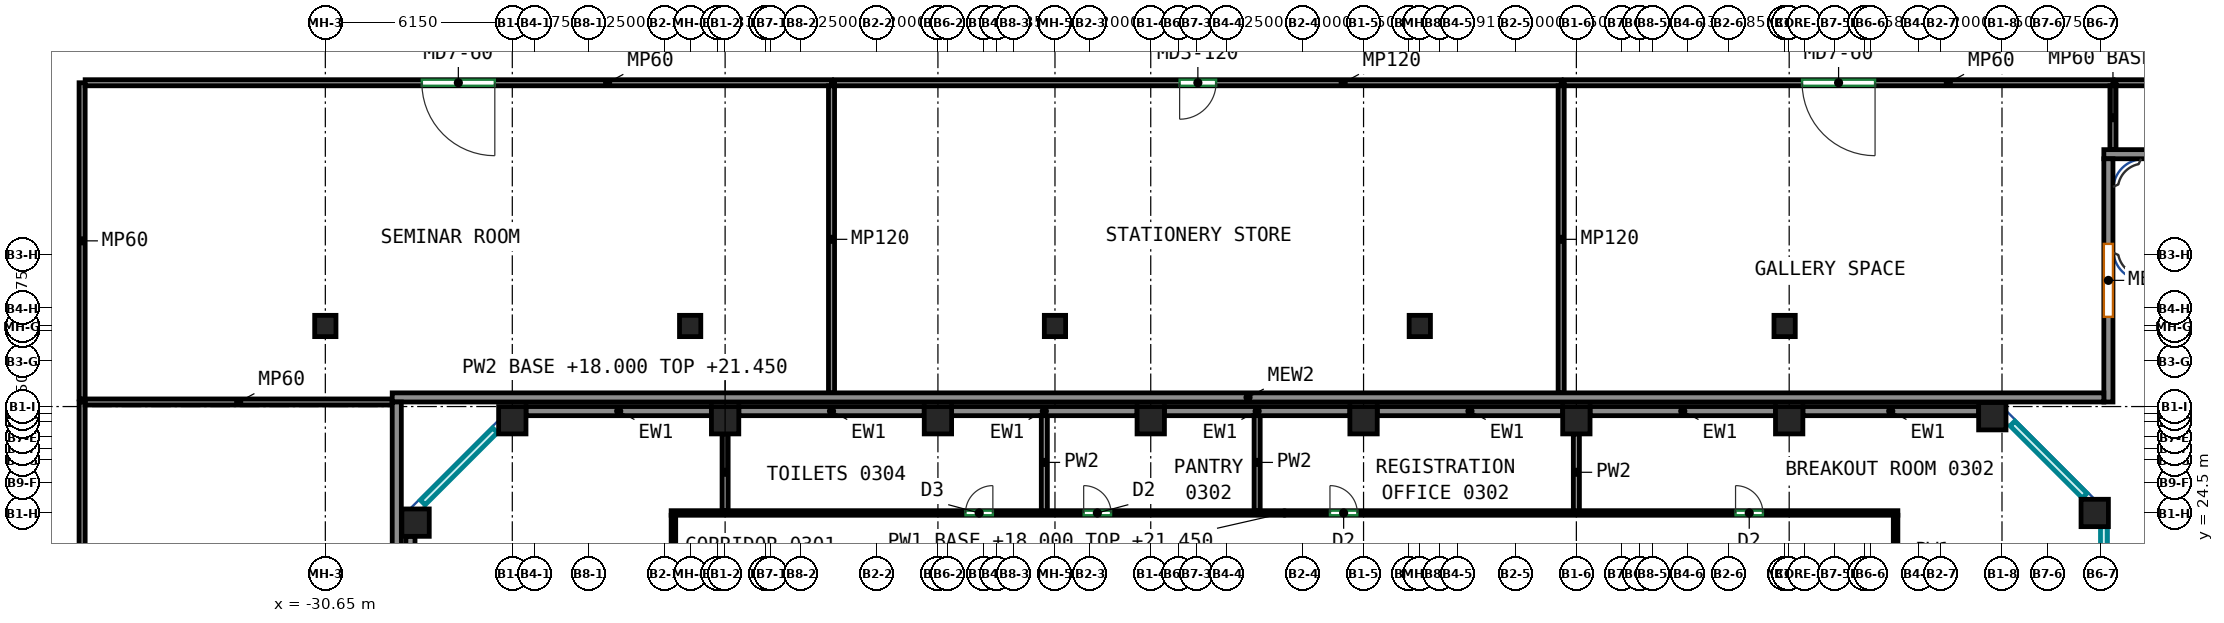
"""IFC4 building model, lengths in metres.
Left out: names, types, materials, properties, quantities, classifications, styles, units other than length and angle.
Written with IfcOpenShell. Run it as: python <this file> out.ifc"""

import sys

from ifc_helpers import new_model, si_unit, direction, frame, frame_2d, origin, origin_2d, place, context, subcontext, project, spatial, rectangle, extrude, source, transform, mapped, element, fill, save


model = new_model("IFC4")
c1 = context("Model", 3, precision=1e-05, world=origin(), true_north=direction((0.0, 1.0)))
c2 = subcontext(c1, "Body", "Model", "MODEL_VIEW")
j1 = project(units=[si_unit("LENGTHUNIT", "METRE"), si_unit("PLANEANGLEUNIT", "RADIAN")], contexts=[c1])
p1 = place(None, origin())
s1 = spatial("IfcSite", under=j1, at=p1, CompositionType="ELEMENT")
p2 = place(p1, origin())
s2 = spatial("IfcBuilding", under=s1, at=p2, CompositionType="ELEMENT")
p3 = place(p2, frame((0.0, 0.0, 18.0)))
s3 = spatial("IfcBuildingStorey", under=s2, at=p3, CompositionType="ELEMENT", Elevation=18.0)
m1 = source(origin(), c2, "Body", "SweptSolid", [
    extrude(rectangle(XDim=0.9, YDim=0.9, at=origin_2d()), origin(), (0.0, 0.0, 1.0), 4.1),
])
for number, where, z_axis, x_axis in (
    (1, (-27.682, 24.182, 0.0), (0.0, 0.0, 1.0), (1.0, 0.0, 0.0)),
    (2, (-24.5, 27.55, 0.0), (0.0, 0.0, 1.0), (1.0, 0.0, 0.0)),
    (3, (-17.5, 27.55, 0.0), (0.0, 0.0, 1.0), (1.0, 0.0, 0.0)),
    (4, (-10.5, 27.55, 0.0), (0.0, 0.0, 1.0), (1.0, 0.0, 0.0)),
    (5, (-3.5, 27.55, 0.0), (0.0, 0.0, 1.0), (1.0, 0.0, 0.0)),
    (6, (3.5, 27.55, 0.0), (0.0, 0.0, 1.0), (1.0, 0.0, 0.0)),
    (7, (10.5, 27.55, 0.0), (0.0, 0.0, 1.0), (1.0, 0.0, 0.0)),
    (8, (17.5, 27.55, 0.0), (0.0, 0.0, 1.0), (1.0, 0.0, 0.0)),
    (9, (24.182, 27.682, 0.0), (0.0, 0.0, 1.0), (1.0, 0.0, 0.0)),
    (10, (27.55, 24.5, 0.0), (0.0, 0.0, 1.0), (1.0, 0.0, 0.0)),
):
    element("IfcColumn", number, at=place(p3, frame(where, z_axis=z_axis, x_axis=x_axis)), inside=s3, PredefinedType="COLUMN", context=c2, shape_type="MappedRepresentation", body=[
        mapped(m1, transform((0.0, 0.0, 0.0))),
    ])
m2 = source(origin(), c2, "Body", "SweptSolid", [
    extrude(rectangle(XDim=0.7, YDim=0.7, at=origin_2d()), origin(), (0.0, 0.0, 1.0), 4.1),
])
for number, where, z_axis, x_axis in (
    (11, (-30.65, 30.65, 0.0), (0.0, 0.0, 1.0), (1.0, 0.0, 0.0)),
    (12, (-18.65, 30.65, 0.0), (0.0, 0.0, 1.0), (1.0, 0.0, 0.0)),
    (13, (-6.65, 30.65, 0.0), (0.0, 0.0, 1.0), (1.0, 0.0, 0.0)),
    (14, (5.35, 30.65, 0.0), (0.0, 0.0, 1.0), (1.0, 0.0, 0.0)),
    (15, (17.35, 30.65, 0.0), (0.0, 0.0, 1.0), (1.0, 0.0, 0.0)),
):
    element("IfcColumn", number, at=place(p3, frame(where, z_axis=z_axis, x_axis=x_axis)), inside=s3, PredefinedType="COLUMN", context=c2, shape_type="MappedRepresentation", body=[
        mapped(m2, transform((0.0, 0.0, 0.0))),
    ])
m3 = source(origin(), c2, "Body", "SweptSolid", [
    extrude(rectangle(XDim=5.782, YDim=0.3, at=frame_2d((2.891, 0.0))), origin(), (0.0, 0.0, 1.0), 4.1),
])
p4 = place(p3, frame((23.732, 27.85, 0.0), z_axis=(0.0, 0.0, 1.0), x_axis=(-1.0, 0.0, 0.0)))
e16 = element("IfcWall", 16, at=p4, inside=s3, PredefinedType="SOLIDWALL", context=c2, shape_type="MappedRepresentation", body=[
    mapped(m3, transform((0.0, 0.0, 0.0))),
])
m4 = source(origin(), c2, "Body", "SweptSolid", [
    extrude(rectangle(XDim=6.1, YDim=0.3, at=frame_2d((3.05, 0.0))), origin(), (0.0, 0.0, 1.0), 4.1),
])
for number, where, z_axis, x_axis in (
    (17, (17.05, 27.85, 0.0), (0.0, 0.0, 1.0), (-1.0, 0.0, 0.0)),
    (18, (10.05, 27.85, 0.0), (0.0, 0.0, 1.0), (-1.0, 0.0, 0.0)),
    (19, (3.05, 27.85, 0.0), (0.0, 0.0, 1.0), (-1.0, 0.0, 0.0)),
    (20, (-3.95, 27.85, 0.0), (0.0, 0.0, 1.0), (-1.0, 0.0, 0.0)),
    (21, (-10.95, 27.85, 0.0), (0.0, 0.0, 1.0), (-1.0, 0.0, 0.0)),
    (22, (-17.95, 27.85, 0.0), (0.0, 0.0, 1.0), (-1.0, 0.0, 0.0)),
):
    element("IfcWall", number, at=place(p3, frame(where, z_axis=z_axis, x_axis=x_axis)), inside=s3, PredefinedType="SOLIDWALL", context=c2, shape_type="MappedRepresentation", body=[
        mapped(m4, transform((0.0, 0.0, 0.0))),
    ])
m5 = source(origin(), c2, "Body", "SweptSolid", [
    extrude(rectangle(XDim=15.282, YDim=0.3, at=frame_2d((7.641, 0.0))), origin(), (0.0, 0.0, 1.0), 4.1),
])
p5 = place(p3, frame((-27.85, 23.732, 0.0), z_axis=(0.0, 0.0, 1.0), x_axis=(0.0, -1.0, 0.0)))
e23 = element("IfcWall", 23, at=p5, inside=s3, PredefinedType="SOLIDWALL", context=c2, shape_type="MappedRepresentation", body=[
    mapped(m5, transform((0.0, 0.0, 0.0))),
])
m6 = source(origin(), c2, "Body", "SweptSolid", [
    extrude(rectangle(XDim=27.7, YDim=0.3, at=frame_2d((13.85, 0.0))), origin(), (0.0, 0.0, 1.0), 4.1),
])
p6 = place(p3, frame((55.55, 36.3, 0.0), z_axis=(0.0, 0.0, 1.0), x_axis=(-1.0, 0.0, 0.0)))
e24 = element("IfcWall", 24, at=p6, inside=s3, PredefinedType="SOLIDWALL", context=c2, shape_type="MappedRepresentation", body=[
    mapped(m6, transform((0.0, 0.0, 0.0))),
])
p7 = place(p6, frame((7.11, 0.0, 0.0)))
e25 = element("IfcOpeningElement", 25, at=p7, cuts=e24, PredefinedType="OPENING", context=c2, shape_type="SweptSolid", body=[
    extrude(rectangle(XDim=2.4, YDim=2.4, at=frame_2d((1.2, 1.2))), frame((0.0, 0.16, 0.0), z_axis=(0.0, -1.0, 0.0), x_axis=(1.0, 0.0, 0.0)), (0.0, 0.0, 1.0), 0.32),
])
p8 = place(p6, frame((18.19, 0.0, 0.0)))
e26 = element("IfcOpeningElement", 26, at=p8, cuts=e24, PredefinedType="OPENING", context=c2, shape_type="SweptSolid", body=[
    extrude(rectangle(XDim=2.4, YDim=2.4, at=frame_2d((1.2, 1.2))), frame((0.0, 0.16, 0.0), z_axis=(0.0, -1.0, 0.0), x_axis=(1.0, 0.0, 0.0)), (0.0, 0.0, 1.0), 0.32),
])
p9 = place(p6, frame((2.65, 0.0, 0.9)))
e27 = element("IfcOpeningElement", 27, at=p9, cuts=e24, PredefinedType="OPENING", context=c2, shape_type="SweptSolid", body=[
    extrude(rectangle(XDim=2.4, YDim=1.8, at=frame_2d((1.2, 0.9))), frame((0.0, 0.16, 0.0), z_axis=(0.0, -1.0, 0.0), x_axis=(1.0, 0.0, 0.0)), (0.0, 0.0, 1.0), 0.32),
])
p10 = place(p6, frame((10.65, 0.0, 0.9)))
e28 = element("IfcOpeningElement", 28, at=p10, cuts=e24, PredefinedType="OPENING", context=c2, shape_type="SweptSolid", body=[
    extrude(rectangle(XDim=2.4, YDim=1.8, at=frame_2d((1.2, 0.9))), frame((0.0, 0.16, 0.0), z_axis=(0.0, -1.0, 0.0), x_axis=(1.0, 0.0, 0.0)), (0.0, 0.0, 1.0), 0.32),
])
p11 = place(p6, frame((14.65, 0.0, 0.9)))
e29 = element("IfcOpeningElement", 29, at=p11, cuts=e24, PredefinedType="OPENING", context=c2, shape_type="SweptSolid", body=[
    extrude(rectangle(XDim=2.4, YDim=1.8, at=frame_2d((1.2, 0.9))), frame((0.0, 0.16, 0.0), z_axis=(0.0, -1.0, 0.0), x_axis=(1.0, 0.0, 0.0)), (0.0, 0.0, 1.0), 0.32),
])
p12 = place(p6, frame((22.65, 0.0, 0.9)))
e30 = element("IfcOpeningElement", 30, at=p12, cuts=e24, PredefinedType="OPENING", context=c2, shape_type="SweptSolid", body=[
    extrude(rectangle(XDim=2.4, YDim=1.8, at=frame_2d((1.2, 0.9))), frame((0.0, 0.16, 0.0), z_axis=(0.0, -1.0, 0.0), x_axis=(1.0, 0.0, 0.0)), (0.0, 0.0, 1.0), 0.32),
])
m7 = source(origin(), c2, "Body", "SweptSolid", [
    extrude(rectangle(XDim=8.0, YDim=0.3, at=frame_2d((4.0, 0.0))), origin(), (0.0, 0.0, 1.0), 4.1),
])
p13 = place(p3, frame((28.0, 36.15, 0.0), z_axis=(0.0, 0.0, 1.0), x_axis=(0.0, -1.0, 0.0)))
e31 = element("IfcWall", 31, at=p13, inside=s3, PredefinedType="SOLIDWALL", context=c2, shape_type="MappedRepresentation", body=[
    mapped(m7, transform((0.0, 0.0, 0.0))),
])
p14 = place(p13, frame((2.8, 0.0, 0.9)))
e32 = element("IfcOpeningElement", 32, at=p14, cuts=e31, PredefinedType="OPENING", context=c2, shape_type="SweptSolid", body=[
    extrude(rectangle(XDim=2.4, YDim=1.8, at=frame_2d((1.2, 0.9))), frame((0.0, 0.16, 0.0), z_axis=(0.0, -1.0, 0.0), x_axis=(1.0, 0.0, 0.0)), (0.0, 0.0, 1.0), 0.32),
])
m8 = source(origin(), c2, "Body", "SweptSolid", [
    extrude(rectangle(XDim=56.3, YDim=0.3, at=frame_2d((28.15, 0.0))), origin(), (0.0, 0.0, 1.0), 4.1),
])
p15 = place(p3, frame((27.85, 28.3, 0.0), z_axis=(0.0, 0.0, 1.0), x_axis=(-1.0, 0.0, 0.0)))
e33 = element("IfcWall", 33, at=p15, inside=s3, PredefinedType="SOLIDWALL", context=c2, shape_type="MappedRepresentation", body=[
    mapped(m8, transform((0.0, 0.0, 0.0))),
])
m9 = source(origin(), c2, "Body", "SweptSolid", [
    extrude(rectangle(XDim=56.3, YDim=0.3, at=frame_2d((28.15, 0.0))), origin(), (0.0, 0.0, 1.0), 4.1),
])
p16 = place(p3, frame((-28.3, 28.15, 0.0), z_axis=(0.0, 0.0, 1.0), x_axis=(0.0, -1.0, 0.0)))
e34 = element("IfcWall", 34, at=p16, inside=s3, PredefinedType="SOLIDWALL", context=c2, shape_type="MappedRepresentation", body=[
    mapped(m9, transform((0.0, 0.0, 0.0))),
])
p17 = place(p3, frame((21.0, 22.09, 0.0), z_axis=(0.0, 0.0, 1.0), x_axis=(0.0, 1.0, 0.0)))
e35 = element("IfcWall", 35, at=p17, inside=s3, PredefinedType="PARTITIONING", context=c2, shape_type="SweptSolid", body=[
    extrude(rectangle(XDim=2.335, YDim=0.15, at=frame_2d((1.167, 0.0))), origin(), (0.0, 0.0, 1.0), 4.1),
])
p18 = place(p3, frame((-19.2, 8.09, 0.0), z_axis=(0.0, 0.0, 1.0), x_axis=(0.0, 1.0, 0.0)))
e36 = element("IfcWall", 36, at=p18, inside=s3, PredefinedType="PARTITIONING", context=c2, shape_type="SweptSolid", body=[
    extrude(rectangle(XDim=16.335, YDim=0.15, at=frame_2d((8.167, 0.0))), origin(), (0.0, 0.0, 1.0), 4.1),
])
p19 = place(p18, frame((8.72, 0.0, 0.0)))
e37 = element("IfcOpeningElement", 37, at=p19, cuts=e36, PredefinedType="OPENING", context=c2, shape_type="SweptSolid", body=[
    extrude(rectangle(XDim=0.9, YDim=2.1, at=frame_2d((0.45, 1.05))), frame((0.0, 0.085, 0.0), z_axis=(0.0, -1.0, 0.0), x_axis=(1.0, 0.0, 0.0)), (0.0, 0.0, 1.0), 0.17),
])
p20 = place(p3, frame((-19.275, 24.5, 0.0), z_axis=(0.0, 0.0, 1.0), x_axis=(1.0, 0.0, 0.0)))
e38 = element("IfcWall", 38, at=p20, inside=s3, PredefinedType="PARTITIONING", context=c2, shape_type="SweptSolid", body=[
    extrude(rectangle(XDim=40.35, YDim=0.15, at=frame_2d((20.175, 0.0))), origin(), (0.0, 0.0, 1.0), 3.45),
])
p21 = place(p20, frame((9.682, 0.0, 0.0)))
e39 = element("IfcOpeningElement", 39, at=p21, cuts=e38, PredefinedType="OPENING", context=c2, shape_type="SweptSolid", body=[
    extrude(rectangle(XDim=0.9, YDim=2.1, at=frame_2d((0.45, 1.05))), frame((0.0, 0.085, 0.0), z_axis=(0.0, -1.0, 0.0), x_axis=(1.0, 0.0, 0.0)), (0.0, 0.0, 1.0), 0.17),
])
p22 = place(p20, frame((13.569, 0.0, 0.0)))
e40 = element("IfcOpeningElement", 40, at=p22, cuts=e38, PredefinedType="OPENING", context=c2, shape_type="SweptSolid", body=[
    extrude(rectangle(XDim=0.9, YDim=2.1, at=frame_2d((0.45, 1.05))), frame((0.0, 0.085, 0.0), z_axis=(0.0, -1.0, 0.0), x_axis=(1.0, 0.0, 0.0)), (0.0, 0.0, 1.0), 0.17),
])
p23 = place(p20, frame((21.67, 0.0, 0.0)))
e41 = element("IfcOpeningElement", 41, at=p23, cuts=e38, PredefinedType="OPENING", context=c2, shape_type="SweptSolid", body=[
    extrude(rectangle(XDim=0.9, YDim=2.1, at=frame_2d((0.45, 1.05))), frame((0.0, 0.085, 0.0), z_axis=(0.0, -1.0, 0.0), x_axis=(1.0, 0.0, 0.0)), (0.0, 0.0, 1.0), 0.17),
])
p24 = place(p20, frame((35.011, 0.0, 0.0)))
e42 = element("IfcOpeningElement", 42, at=p24, cuts=e38, PredefinedType="OPENING", context=c2, shape_type="SweptSolid", body=[
    extrude(rectangle(XDim=0.9, YDim=2.1, at=frame_2d((0.45, 1.05))), frame((0.0, 0.085, 0.0), z_axis=(0.0, -1.0, 0.0), x_axis=(1.0, 0.0, 0.0)), (0.0, 0.0, 1.0), 0.17),
])
p25 = place(p3, frame((10.5, 27.1, 0.0), z_axis=(0.0, 0.0, 1.0), x_axis=(0.0, -1.0, 0.0)))
e43 = element("IfcWall", 43, at=p25, inside=s3, PredefinedType="PARTITIONING", context=c2, shape_type="SweptSolid", body=[
    extrude(rectangle(XDim=2.524, YDim=0.2, at=frame_2d((1.262, 0.0))), origin(), (0.0, 0.0, 1.0), 4.1),
])
for number, where, z_axis, x_axis in (
    (44, (0.0, 24.576, 0.0), (0.0, 0.0, 1.0), (0.0, 1.0, 0.0)),
    (45, (-7.0, 27.75, 0.0), (0.0, 0.0, 1.0), (0.0, -1.0, 0.0)),
):
    element("IfcWall", number, at=place(p3, frame(where, z_axis=z_axis, x_axis=x_axis)), inside=s3, PredefinedType="PARTITIONING", context=c2, shape_type="SweptSolid", body=[
        extrude(rectangle(XDim=3.174, YDim=0.2, at=frame_2d((1.587, 0.0))), origin(), (0.0, 0.0, 1.0), 4.1),
    ])
p26 = place(p3, frame((-17.5, 24.576, 0.0), z_axis=(0.0, 0.0, 1.0), x_axis=(0.0, 1.0, 0.0)))
e46 = element("IfcWall", 46, at=p26, inside=s3, PredefinedType="PARTITIONING", context=c2, shape_type="SweptSolid", body=[
    extrude(rectangle(XDim=2.524, YDim=0.2, at=frame_2d((1.262, 0.0))), origin(), (0.0, 0.0, 1.0), 3.45),
])
m10 = source(origin(), c2, "Body", "SweptSolid", [
    extrude(rectangle(XDim=18.05, YDim=0.2, at=frame_2d((9.025, 0.0))), origin(), (0.0, 0.0, 1.0), 3.3),
])
p27 = place(p3, frame((-38.65, 28.15, 0.0), z_axis=(0.0, 0.0, 1.0), x_axis=(0.0, -1.0, 0.0)))
e47 = element("IfcWall", 47, at=p27, inside=s3, PredefinedType="PARTITIONING", context=c2, shape_type="MappedRepresentation", body=[
    mapped(m10, transform((0.0, 0.0, 0.0))),
])
p28 = place(p27, frame((7.825, 0.0, 0.0)))
e48 = element("IfcOpeningElement", 48, at=p28, cuts=e47, PredefinedType="OPENING", context=c2, shape_type="SweptSolid", body=[
    extrude(rectangle(XDim=2.4, YDim=2.4, at=frame_2d((1.2, 1.2))), frame((0.0, 0.11, 0.0), z_axis=(0.0, -1.0, 0.0), x_axis=(1.0, 0.0, 0.0)), (0.0, 0.0, 1.0), 0.22),
])
m11 = source(origin(), c2, "Body", "SweptSolid", [
    extrude(rectangle(XDim=10.1, YDim=0.2, at=frame_2d((5.05, 0.0))), origin(), (0.0, 0.0, 1.0), 3.3),
])
p29 = place(p3, frame((-38.55, 28.15, 0.0), z_axis=(0.0, 0.0, 1.0), x_axis=(1.0, 0.0, 0.0)))
e49 = element("IfcWall", 49, at=p29, inside=s3, PredefinedType="PARTITIONING", context=c2, shape_type="MappedRepresentation", body=[
    mapped(m11, transform((0.0, 0.0, 0.0))),
])
m12 = source(origin(), c2, "Body", "SweptSolid", [
    extrude(rectangle(XDim=10.4, YDim=0.2, at=frame_2d((5.2, 0.0))), origin(), (0.0, 0.0, 1.0), 3.3),
])
p30 = place(p3, frame((-38.65, 38.65, 0.0), z_axis=(0.0, 0.0, 1.0), x_axis=(0.0, -1.0, 0.0)))
e50 = element("IfcWall", 50, at=p30, inside=s3, PredefinedType="PARTITIONING", context=c2, shape_type="MappedRepresentation", body=[
    mapped(m12, transform((0.0, 0.0, 0.0))),
])
m13 = source(origin(), c2, "Body", "SweptSolid", [
    extrude(rectangle(XDim=24.55, YDim=0.2, at=frame_2d((12.275, 0.0))), origin(), (0.0, 0.0, 1.0), 3.3),
])
p31 = place(p3, frame((-14.0, 38.65, 0.0), z_axis=(0.0, 0.0, 1.0), x_axis=(-1.0, 0.0, 0.0)))
e51 = element("IfcWall", 51, at=p31, inside=s3, PredefinedType="PARTITIONING", context=c2, shape_type="MappedRepresentation", body=[
    mapped(m13, transform((0.0, 0.0, 0.0))),
])
p32 = place(p31, frame((11.075, 0.0, 0.0)))
e52 = element("IfcOpeningElement", 52, at=p32, cuts=e51, PredefinedType="OPENING", context=c2, shape_type="SweptSolid", body=[
    extrude(rectangle(XDim=2.4, YDim=2.4, at=frame_2d((1.2, 1.2))), frame((0.0, 0.11, 0.0), z_axis=(0.0, -1.0, 0.0), x_axis=(1.0, 0.0, 0.0)), (0.0, 0.0, 1.0), 0.22),
])
p33 = place(p3, frame((-14.0, 38.55, 0.0), z_axis=(0.0, 0.0, 1.0), x_axis=(0.0, -1.0, 0.0)))
e53 = element("IfcWall", 53, at=p33, inside=s3, PredefinedType="PARTITIONING", context=c2, shape_type="MappedRepresentation", body=[
    mapped(m11, transform((0.0, 0.0, 0.0))),
])
m14 = source(origin(), c2, "Body", "SweptSolid", [
    extrude(rectangle(XDim=23.9, YDim=0.2, at=frame_2d((11.95, 0.0))), origin(), (0.0, 0.0, 1.0), 3.3),
])
p34 = place(p3, frame((10.0, 38.65, 0.0), z_axis=(0.0, 0.0, 1.0), x_axis=(-1.0, 0.0, 0.0)))
e54 = element("IfcWall", 54, at=p34, inside=s3, PredefinedType="PARTITIONING", context=c2, shape_type="MappedRepresentation", body=[
    mapped(m14, transform((0.0, 0.0, 0.0))),
])
p35 = place(p34, frame((11.35, 0.0, 0.0)))
e55 = element("IfcOpeningElement", 55, at=p35, cuts=e54, PredefinedType="OPENING", context=c2, shape_type="SweptSolid", body=[
    extrude(rectangle(XDim=1.2, YDim=2.1, at=frame_2d((0.6, 1.05))), frame((0.0, 0.11, 0.0), z_axis=(0.0, -1.0, 0.0), x_axis=(1.0, 0.0, 0.0)), (0.0, 0.0, 1.0), 0.22),
])
p36 = place(p3, frame((10.0, 38.55, 0.0), z_axis=(0.0, 0.0, 1.0), x_axis=(0.0, -1.0, 0.0)))
e56 = element("IfcWall", 56, at=p36, inside=s3, PredefinedType="PARTITIONING", context=c2, shape_type="MappedRepresentation", body=[
    mapped(m11, transform((0.0, 0.0, 0.0))),
])
p37 = place(p3, frame((28.15, 38.65, 0.0), z_axis=(0.0, 0.0, 1.0), x_axis=(-1.0, 0.0, 0.0)))
e57 = element("IfcWall", 57, at=p37, inside=s3, PredefinedType="PARTITIONING", context=c2, shape_type="MappedRepresentation", body=[
    mapped(m10, transform((0.0, 0.0, 0.0))),
])
p38 = place(p37, frame((7.825, 0.0, 0.0)))
e58 = element("IfcOpeningElement", 58, at=p38, cuts=e57, PredefinedType="OPENING", context=c2, shape_type="SweptSolid", body=[
    extrude(rectangle(XDim=2.4, YDim=2.4, at=frame_2d((1.2, 1.2))), frame((0.0, 0.11, 0.0), z_axis=(0.0, -1.0, 0.0), x_axis=(1.0, 0.0, 0.0)), (0.0, 0.0, 1.0), 0.22),
])
m15 = source(origin(), c2, "Body", "SweptSolid", [
    extrude(rectangle(XDim=2.1, YDim=0.2, at=frame_2d((1.05, 0.0))), origin(), (0.0, 0.0, 1.0), 4.1),
])
p39 = place(p3, frame((28.15, 38.55, 0.0), z_axis=(0.0, 0.0, 1.0), x_axis=(0.0, -1.0, 0.0)))
e59 = element("IfcWall", 59, at=p39, inside=s3, PredefinedType="PARTITIONING", context=c2, shape_type="MappedRepresentation", body=[
    mapped(m15, transform((0.0, 0.0, 0.0))),
])
m16 = source(origin(), c2, "Body", "SweptSolid", [
    extrude(rectangle(XDim=27.3, YDim=0.2, at=frame_2d((13.65, 0.0))), origin(), (0.0, 0.0, 1.0), 2.8),
])
p40 = place(p3, frame((55.55, 38.65, 0.0), z_axis=(0.0, 0.0, 1.0), x_axis=(-1.0, 0.0, 0.0)))
e60 = element("IfcWall", 60, at=p40, inside=s3, PredefinedType="PARTITIONING", context=c2, shape_type="MappedRepresentation", body=[
    mapped(m16, transform((0.0, 0.0, 0.0))),
])
p41 = place(p40, frame((12.45, 0.0, 0.0)))
e61 = element("IfcOpeningElement", 61, at=p41, cuts=e60, PredefinedType="OPENING", context=c2, shape_type="SweptSolid", body=[
    extrude(rectangle(XDim=2.4, YDim=2.4, at=frame_2d((1.2, 1.2))), frame((0.0, 0.11, 0.0), z_axis=(0.0, -1.0, 0.0), x_axis=(1.0, 0.0, 0.0)), (0.0, 0.0, 1.0), 0.22),
])
p42 = place(p14, origin())
e62 = element("IfcWindow", 62, at=p42, inside=s3, PartitioningType="SINGLE_PANEL", PredefinedType="WINDOW", context=c2, shape_type="SweptSolid", body=[
    extrude(rectangle(XDim=2.4, YDim=1.8, at=frame_2d((1.2, 0.9))), frame((0.0, 0.03, 0.0), z_axis=(0.0, -1.0, 0.0), x_axis=(1.0, 0.0, 0.0)), (0.0, 0.0, 1.0), 0.06),
])
fill(e32, e62)
p43 = place(p21, origin())
e63 = element("IfcDoor", 63, at=p43, inside=s3, OperationType="SINGLE_SWING_RIGHT", PredefinedType="DOOR", context=c2, shape_type="SweptSolid", body=[
    extrude(rectangle(XDim=0.9, YDim=2.1, at=frame_2d((0.45, 1.05))), frame((0.0, 0.025, 0.0), z_axis=(0.0, -1.0, 0.0), x_axis=(1.0, 0.0, 0.0)), (0.0, 0.0, 1.0), 0.05),
])
fill(e39, e63)
p44 = place(p22, origin())
e64 = element("IfcDoor", 64, at=p44, inside=s3, OperationType="SINGLE_SWING_LEFT", PredefinedType="DOOR", context=c2, shape_type="SweptSolid", body=[
    extrude(rectangle(XDim=0.9, YDim=2.1, at=frame_2d((0.45, 1.05))), frame((0.0, 0.025, 0.0), z_axis=(0.0, -1.0, 0.0), x_axis=(1.0, 0.0, 0.0)), (0.0, 0.0, 1.0), 0.05),
])
fill(e40, e64)
p45 = place(p23, origin())
e65 = element("IfcDoor", 65, at=p45, inside=s3, OperationType="SINGLE_SWING_LEFT", PredefinedType="DOOR", context=c2, shape_type="SweptSolid", body=[
    extrude(rectangle(XDim=0.9, YDim=2.1, at=frame_2d((0.45, 1.05))), frame((0.0, 0.025, 0.0), z_axis=(0.0, -1.0, 0.0), x_axis=(1.0, 0.0, 0.0)), (0.0, 0.0, 1.0), 0.05),
])
fill(e41, e65)
p46 = place(p24, origin())
e66 = element("IfcDoor", 66, at=p46, inside=s3, OperationType="SINGLE_SWING_LEFT", PredefinedType="DOOR", context=c2, shape_type="SweptSolid", body=[
    extrude(rectangle(XDim=0.9, YDim=2.1, at=frame_2d((0.45, 1.05))), frame((0.0, 0.025, 0.0), z_axis=(0.0, -1.0, 0.0), x_axis=(1.0, 0.0, 0.0)), (0.0, 0.0, 1.0), 0.05),
])
fill(e42, e66)
p47 = place(p32, origin())
e67 = element("IfcDoor", 67, at=p47, inside=s3, OperationType="DOUBLE_DOOR_SINGLE_SWING", PredefinedType="DOOR", context=c2, shape_type="SweptSolid", body=[
    extrude(rectangle(XDim=2.4, YDim=2.4, at=frame_2d((1.2, 1.2))), frame((0.0, 0.025, 0.0), z_axis=(0.0, -1.0, 0.0), x_axis=(1.0, 0.0, 0.0)), (0.0, 0.0, 1.0), 0.05),
])
fill(e52, e67)
p48 = place(p35, origin())
e68 = element("IfcDoor", 68, at=p48, inside=s3, OperationType="SINGLE_SWING_RIGHT", PredefinedType="DOOR", context=c2, shape_type="SweptSolid", body=[
    extrude(rectangle(XDim=1.2, YDim=2.1, at=frame_2d((0.6, 1.05))), frame((0.0, 0.025, 0.0), z_axis=(0.0, -1.0, 0.0), x_axis=(1.0, 0.0, 0.0)), (0.0, 0.0, 1.0), 0.05),
])
fill(e55, e68)
p49 = place(p38, origin())
e69 = element("IfcDoor", 69, at=p49, inside=s3, OperationType="DOUBLE_DOOR_SINGLE_SWING", PredefinedType="DOOR", context=c2, shape_type="SweptSolid", body=[
    extrude(rectangle(XDim=2.4, YDim=2.4, at=frame_2d((1.2, 1.2))), frame((0.0, 0.025, 0.0), z_axis=(0.0, -1.0, 0.0), x_axis=(1.0, 0.0, 0.0)), (0.0, 0.0, 1.0), 0.05),
])
fill(e58, e69)
save(model, sys.argv[1])
